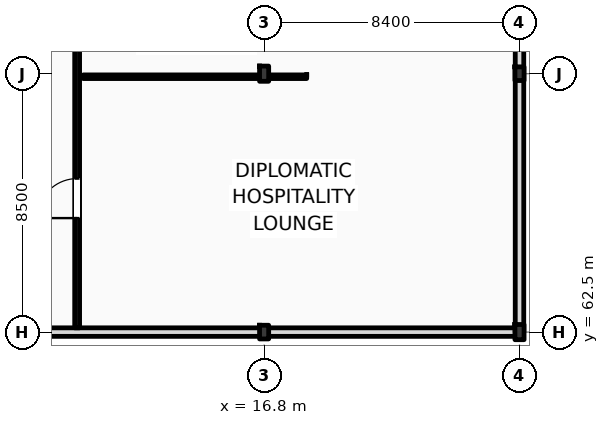
"""IFC4 building model, lengths in metres.
Left out: names, types, materials, properties, quantities, classifications, styles, units other than length and angle.
Written with IfcOpenShell. Run it as: python <this file> out.ifc"""

import sys

from ifc_helpers import new_model, si_unit, direction, frame, frame_2d, origin, origin_2d, place, context, subcontext, project, spatial, rectangle, i_section, extrude, element, fill, save


model = new_model("IFC4")
c1 = context("Model", 3, precision=1e-05, world=origin(), true_north=direction((0.0, 1.0)))
c2 = subcontext(c1, "Body", "Model", "MODEL_VIEW")
j1 = project(units=[si_unit("LENGTHUNIT", "METRE"), si_unit("PLANEANGLEUNIT", "RADIAN")], contexts=[c1])
p1 = place(None, origin())
s1 = spatial("IfcSite", under=j1, at=p1, CompositionType="ELEMENT")
p2 = place(p1, origin())
s2 = spatial("IfcBuilding", under=s1, at=p2, CompositionType="ELEMENT")
p3 = place(p2, frame((0.0, 0.0, 28.2)))
s3 = spatial("IfcBuildingStorey", under=s2, at=p3, CompositionType="ELEMENT", Elevation=28.2)
p4 = place(p3, frame((16.8, 62.5, 0.0), z_axis=(0.0, 0.0, 1.0), x_axis=(1.0, 0.0, 0.0)))
e1 = element("IfcColumn", 1, at=p4, inside=s3, PredefinedType="COLUMN", context=c2, shape_type="SweptSolid", body=[
    extrude(i_section(OverallWidth=0.3, OverallDepth=0.45, WebThickness=0.014, FlangeThickness=0.026, FilletRadius=0.027, at=origin_2d()), origin(), (0.0, 0.0, 1.0), 3.6),
])
for number, where, z_axis, x_axis in (
    (2, (16.8, 71.0, 0.0), (0.0, 0.0, 1.0), (1.0, 0.0, 0.0)),
    (3, (25.2, 62.5, 0.0), (0.0, 0.0, 1.0), (1.0, 0.0, 0.0)),
):
    element("IfcColumn", number, at=place(p3, frame(where, z_axis=z_axis, x_axis=x_axis)), inside=s3, PredefinedType="COLUMN", context=c2, shape_type="SweptSolid", body=[
        extrude(i_section(OverallWidth=0.3, OverallDepth=0.5, WebThickness=0.014, FlangeThickness=0.028, FilletRadius=0.027, at=origin_2d()), origin(), (0.0, 0.0, 1.0), 3.6),
    ])
p5 = place(p3, frame((25.2, 71.0, 0.0), z_axis=(0.0, 0.0, 1.0), x_axis=(1.0, 0.0, 0.0)))
e4 = element("IfcColumn", 4, at=p5, inside=s3, PredefinedType="COLUMN", context=c2, shape_type="SweptSolid", body=[
    extrude(i_section(OverallWidth=0.3, OverallDepth=0.45, WebThickness=0.014, FlangeThickness=0.026, FilletRadius=0.027, at=origin_2d()), origin(), (0.0, 0.0, 1.0), 3.6),
])
p6 = place(p3, frame((0.0, 62.5, 0.0), z_axis=(0.0, 0.0, 1.0), x_axis=(1.0, 0.0, 0.0)))
e5 = element("IfcWall", 5, at=p6, inside=s3, PredefinedType="STANDARD", context=c2, shape_type="SweptSolid", body=[
    extrude(rectangle(XDim=25.2, YDim=0.28, at=frame_2d((12.6, 0.0))), origin(), (0.0, 0.0, 1.0), 2.8),
])
p7 = place(p3, frame((25.2, 62.5, 0.0), z_axis=(0.0, 0.0, 1.0), x_axis=(0.0, 1.0, 0.0)))
e6 = element("IfcWall", 6, at=p7, inside=s3, PredefinedType="STANDARD", context=c2, shape_type="SweptSolid", body=[
    extrude(rectangle(XDim=17.0, YDim=0.28, at=frame_2d((8.5, 0.0))), origin(), (0.0, 0.0, 1.0), 2.99),
])
p8 = place(p3, frame((10.65, 62.64, 0.0), z_axis=(0.0, 0.0, 1.0), x_axis=(0.0, 1.0, 0.0)))
e7 = element("IfcWall", 7, at=p8, inside=s3, PredefinedType="PARTITIONING", context=c2, shape_type="SweptSolid", body=[
    extrude(rectangle(XDim=16.31, YDim=0.16, at=frame_2d((8.155, 0.0))), origin(), (0.0, 0.0, 1.0), 3.36),
])
p9 = place(p8, frame((3.61, 0.0, 0.0)))
e8 = element("IfcOpeningElement", 8, at=p9, cuts=e7, PredefinedType="OPENING", context=c2, shape_type="SweptSolid", body=[
    extrude(rectangle(XDim=1.3, YDim=2.2, at=frame_2d((0.65, 1.1))), frame((0.0, 0.09, 0.0), z_axis=(0.0, -1.0, 0.0), x_axis=(1.0, 0.0, 0.0)), (0.0, 0.0, 1.0), 0.18),
])
p10 = place(p8, frame((9.735, 0.0, 0.0)))
e9 = element("IfcOpeningElement", 9, at=p10, cuts=e7, PredefinedType="OPENING", context=c2, shape_type="SweptSolid", body=[
    extrude(rectangle(XDim=1.05, YDim=2.12, at=frame_2d((0.525, 1.06))), frame((0.0, 0.09, 0.0), z_axis=(0.0, -1.0, 0.0), x_axis=(1.0, 0.0, 0.0)), (0.0, 0.0, 1.0), 0.18),
])
p11 = place(p8, frame((13.49, 0.0, 0.0)))
e10 = element("IfcOpeningElement", 10, at=p11, cuts=e7, PredefinedType="OPENING", context=c2, shape_type="SweptSolid", body=[
    extrude(rectangle(XDim=0.94, YDim=2.15, at=frame_2d((0.47, 1.075))), frame((0.0, 0.09, 0.0), z_axis=(0.0, -1.0, 0.0), x_axis=(1.0, 0.0, 0.0)), (0.0, 0.0, 1.0), 0.18),
])
p12 = place(p3, frame((10.85, 70.9, 0.0), z_axis=(0.0, 0.0, 1.0), x_axis=(1.0, 0.0, 0.0)))
e11 = element("IfcWall", 11, at=p12, inside=s3, PredefinedType="PARTITIONING", context=c2, shape_type="SweptSolid", body=[
    extrude(rectangle(XDim=7.35, YDim=0.12, at=frame_2d((3.675, 0.0))), origin(), (0.0, 0.0, 1.0), 2.8),
])
p13 = place(p9, origin())
e12 = element("IfcDoor", 12, at=p13, inside=s3, OperationType="SINGLE_SWING_LEFT", PredefinedType="DOOR", context=c2, shape_type="SweptSolid", body=[
    extrude(rectangle(XDim=1.3, YDim=2.2, at=frame_2d((0.65, 1.1))), frame((0.0, 0.025, 0.0), z_axis=(0.0, -1.0, 0.0), x_axis=(1.0, 0.0, 0.0)), (0.0, 0.0, 1.0), 0.05),
])
fill(e8, e12)
save(model, sys.argv[1])
